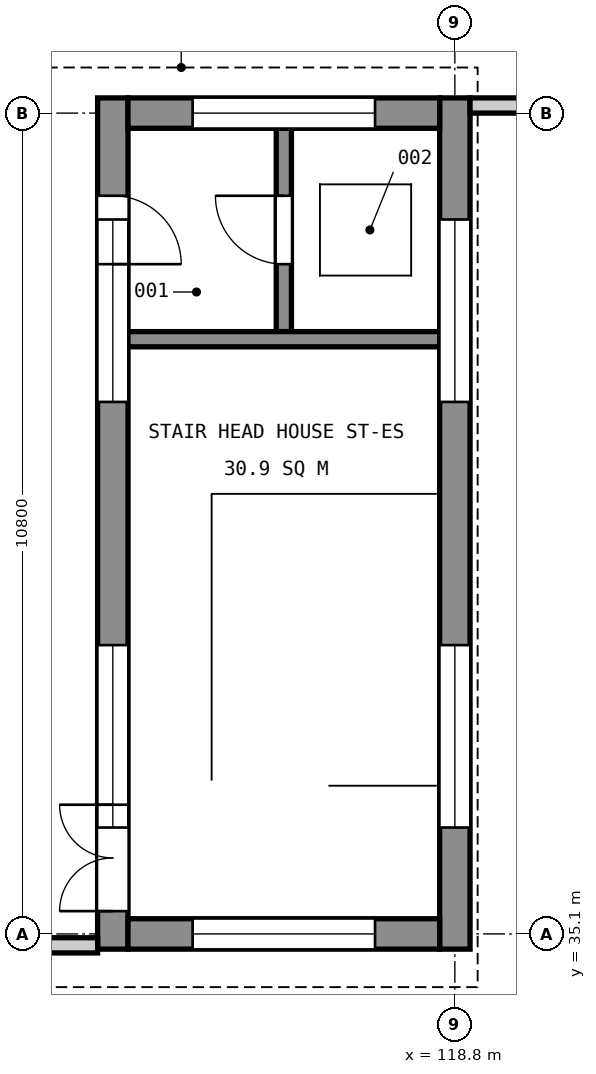
"""IFC4 building model, lengths in metres.
Left out: names, types, materials, properties, quantities, classifications, styles, units other than length and angle.
Written with IfcOpenShell. Run it as: python <this file> out.ifc"""

import sys

from ifc_helpers import new_model, si_unit, direction, frame, frame_2d, origin, place, context, subcontext, project, spatial, rectangle, extrude, element, fill, save


model = new_model("IFC4")
c1 = context("Model", 3, precision=1e-05, world=origin(), true_north=direction((0.0, 1.0)))
c2 = subcontext(c1, "Body", "Model", "MODEL_VIEW")
j1 = project(units=[si_unit("LENGTHUNIT", "METRE"), si_unit("PLANEANGLEUNIT", "RADIAN")], contexts=[c1])
p1 = place(None, origin())
s1 = spatial("IfcSite", under=j1, at=p1, CompositionType="ELEMENT")
p2 = place(p1, origin())
s2 = spatial("IfcBuilding", under=s1, at=p2, CompositionType="ELEMENT")
p3 = place(p2, frame((0.0, 0.0, 46.2)))
s3 = spatial("IfcBuildingStorey", under=s2, at=p3, CompositionType="ELEMENT", Elevation=46.2)
p4 = place(p3, frame((118.8, 34.9, 0.0), z_axis=(0.0, 0.0, 1.0), x_axis=(0.0, 1.0, 0.0)))
e1 = element("IfcWall", 1, at=p4, inside=s3, PredefinedType="SHEAR", context=c2, shape_type="SweptSolid", body=[
    extrude(rectangle(XDim=11.2, YDim=0.4, at=frame_2d((5.6, 0.0))), origin(), (0.0, 0.0, 1.0), 4.8),
])
p5 = place(p4, frame((1.6, 0.0, 3.4)))
e2 = element("IfcOpeningElement", 2, at=p5, cuts=e1, PredefinedType="OPENING", context=c2, shape_type="SweptSolid", body=[
    extrude(rectangle(XDim=2.4, YDim=1.2, at=frame_2d((1.2, 0.6))), frame((0.0, 0.21, 0.0), z_axis=(0.0, -1.0, 0.0), x_axis=(1.0, 0.0, 0.0)), (0.0, 0.0, 1.0), 0.42),
])
p6 = place(p4, frame((7.2, 0.0, 3.4)))
e3 = element("IfcOpeningElement", 3, at=p6, cuts=e1, PredefinedType="OPENING", context=c2, shape_type="SweptSolid", body=[
    extrude(rectangle(XDim=2.4, YDim=1.2, at=frame_2d((1.2, 0.6))), frame((0.0, 0.21, 0.0), z_axis=(0.0, -1.0, 0.0), x_axis=(1.0, 0.0, 0.0)), (0.0, 0.0, 1.0), 0.42),
])
p7 = place(p3, frame((114.3, 34.9, 0.0), z_axis=(0.0, 0.0, 1.0), x_axis=(0.0, 1.0, 0.0)))
e4 = element("IfcWall", 4, at=p7, inside=s3, PredefinedType="SHEAR", context=c2, shape_type="SweptSolid", body=[
    extrude(rectangle(XDim=11.2, YDim=0.4, at=frame_2d((5.6, 0.0))), origin(), (0.0, 0.0, 1.0), 4.8),
])
p8 = place(p7, frame((0.5, 0.0, 0.0)))
e5 = element("IfcOpeningElement", 5, at=p8, cuts=e4, PredefinedType="OPENING", context=c2, shape_type="SweptSolid", body=[
    extrude(rectangle(XDim=1.4, YDim=2.1, at=frame_2d((0.7, 1.05))), frame((0.0, 0.21, 0.0), z_axis=(0.0, -1.0, 0.0), x_axis=(1.0, 0.0, 0.0)), (0.0, 0.0, 1.0), 0.42),
])
p9 = place(p7, frame((1.6, 0.0, 3.4)))
e6 = element("IfcOpeningElement", 6, at=p9, cuts=e4, PredefinedType="OPENING", context=c2, shape_type="SweptSolid", body=[
    extrude(rectangle(XDim=2.4, YDim=1.2, at=frame_2d((1.2, 0.6))), frame((0.0, 0.21, 0.0), z_axis=(0.0, -1.0, 0.0), x_axis=(1.0, 0.0, 0.0)), (0.0, 0.0, 1.0), 0.42),
])
p10 = place(p7, frame((7.2, 0.0, 3.4)))
e7 = element("IfcOpeningElement", 7, at=p10, cuts=e4, PredefinedType="OPENING", context=c2, shape_type="SweptSolid", body=[
    extrude(rectangle(XDim=2.4, YDim=1.2, at=frame_2d((1.2, 0.6))), frame((0.0, 0.21, 0.0), z_axis=(0.0, -1.0, 0.0), x_axis=(1.0, 0.0, 0.0)), (0.0, 0.0, 1.0), 0.42),
])
p11 = place(p7, frame((9.012, 0.0, 0.0)))
e8 = element("IfcOpeningElement", 8, at=p11, cuts=e4, PredefinedType="OPENING", context=c2, shape_type="SweptSolid", body=[
    extrude(rectangle(XDim=0.9, YDim=2.1, at=frame_2d((0.45, 1.05))), frame((0.0, 0.21, 0.0), z_axis=(0.0, -1.0, 0.0), x_axis=(1.0, 0.0, 0.0)), (0.0, 0.0, 1.0), 0.42),
])
p12 = place(p3, frame((118.6, 35.1, 0.0), z_axis=(0.0, 0.0, 1.0), x_axis=(-1.0, 0.0, 0.0)))
e9 = element("IfcWall", 9, at=p12, inside=s3, PredefinedType="SHEAR", context=c2, shape_type="SweptSolid", body=[
    extrude(rectangle(XDim=4.1, YDim=0.4, at=frame_2d((2.05, 0.0))), origin(), (0.0, 0.0, 1.0), 4.8),
])
p13 = place(p12, frame((0.85, 0.0, 3.4)))
e10 = element("IfcOpeningElement", 10, at=p13, cuts=e9, PredefinedType="OPENING", context=c2, shape_type="SweptSolid", body=[
    extrude(rectangle(XDim=2.4, YDim=1.2, at=frame_2d((1.2, 0.6))), frame((0.0, 0.21, 0.0), z_axis=(0.0, -1.0, 0.0), x_axis=(1.0, 0.0, 0.0)), (0.0, 0.0, 1.0), 0.42),
])
p14 = place(p3, frame((118.6, 45.9, 0.0), z_axis=(0.0, 0.0, 1.0), x_axis=(-1.0, 0.0, 0.0)))
e11 = element("IfcWall", 11, at=p14, inside=s3, PredefinedType="SHEAR", context=c2, shape_type="SweptSolid", body=[
    extrude(rectangle(XDim=4.1, YDim=0.4, at=frame_2d((2.05, 0.0))), origin(), (0.0, 0.0, 1.0), 4.8),
])
p15 = place(p14, frame((0.85, 0.0, 3.4)))
e12 = element("IfcOpeningElement", 12, at=p15, cuts=e11, PredefinedType="OPENING", context=c2, shape_type="SweptSolid", body=[
    extrude(rectangle(XDim=2.4, YDim=1.2, at=frame_2d((1.2, 0.6))), frame((0.0, 0.21, 0.0), z_axis=(0.0, -1.0, 0.0), x_axis=(1.0, 0.0, 0.0)), (0.0, 0.0, 1.0), 0.42),
])
p16 = place(p3, frame((114.1, 34.95, 0.0), z_axis=(0.0, 0.0, 1.0), x_axis=(-1.0, 0.0, 0.0)))
e13 = element("IfcWall", 13, at=p16, inside=s3, PredefinedType="PARAPET", context=c2, shape_type="SweptSolid", body=[
    extrude(rectangle(XDim=2.5, YDim=0.2, at=frame_2d((1.25, 0.0))), origin(), (0.0, 0.0, 1.0), 1.2),
])
p17 = place(p3, frame((122.4, 46.0, 0.0), z_axis=(0.0, 0.0, 1.0), x_axis=(-1.0, 0.0, 0.0)))
e14 = element("IfcWall", 14, at=p17, inside=s3, PredefinedType="PARAPET", context=c2, shape_type="SweptSolid", body=[
    extrude(rectangle(XDim=3.4, YDim=0.2, at=frame_2d((1.7, 0.0))), origin(), (0.0, 0.0, 1.0), 1.2),
])
p18 = place(p3, frame((116.55, 43.025, 0.0), z_axis=(0.0, 0.0, 1.0), x_axis=(0.0, 1.0, 0.0)))
e15 = element("IfcWall", 15, at=p18, inside=s3, PredefinedType="SOLIDWALL", context=c2, shape_type="SweptSolid", body=[
    extrude(rectangle(XDim=2.675, YDim=0.2, at=frame_2d((1.337, 0.0))), origin(), (0.0, 0.0, 1.0), 4.8),
])
p19 = place(p18, frame((0.887, 0.0, 0.0)))
e16 = element("IfcOpeningElement", 16, at=p19, cuts=e15, PredefinedType="OPENING", context=c2, shape_type="SweptSolid", body=[
    extrude(rectangle(XDim=0.9, YDim=2.1, at=frame_2d((0.45, 1.05))), frame((0.0, 0.11, 0.0), z_axis=(0.0, -1.0, 0.0), x_axis=(1.0, 0.0, 0.0)), (0.0, 0.0, 1.0), 0.22),
])
p20 = place(p3, frame((114.5, 42.925, 0.0), z_axis=(0.0, 0.0, 1.0), x_axis=(1.0, 0.0, 0.0)))
e17 = element("IfcWall", 17, at=p20, inside=s3, PredefinedType="SOLIDWALL", context=c2, shape_type="SweptSolid", body=[
    extrude(rectangle(XDim=4.1, YDim=0.2, at=frame_2d((2.05, 0.0))), origin(), (0.0, 0.0, 1.0), 4.8),
])
p21 = place(p8, origin())
e18 = element("IfcDoor", 18, at=p21, inside=s3, OperationType="DOUBLE_DOOR_SINGLE_SWING", PredefinedType="DOOR", context=c2, shape_type="SweptSolid", body=[
    extrude(rectangle(XDim=1.4, YDim=2.1, at=frame_2d((0.7, 1.05))), frame((0.0, 0.025, 0.0), z_axis=(0.0, -1.0, 0.0), x_axis=(1.0, 0.0, 0.0)), (0.0, 0.0, 1.0), 0.05),
])
fill(e5, e18)
p22 = place(p5, origin())
e19 = element("IfcWindow", 19, at=p22, inside=s3, PartitioningType="SINGLE_PANEL", PredefinedType="USERDEFINED", context=c2, shape_type="SweptSolid", body=[
    extrude(rectangle(XDim=2.4, YDim=1.2, at=frame_2d((1.2, 0.6))), frame((0.0, 0.03, 0.0), z_axis=(0.0, -1.0, 0.0), x_axis=(1.0, 0.0, 0.0)), (0.0, 0.0, 1.0), 0.06),
])
fill(e2, e19)
p23 = place(p6, origin())
e20 = element("IfcWindow", 20, at=p23, inside=s3, PartitioningType="SINGLE_PANEL", PredefinedType="USERDEFINED", context=c2, shape_type="SweptSolid", body=[
    extrude(rectangle(XDim=2.4, YDim=1.2, at=frame_2d((1.2, 0.6))), frame((0.0, 0.03, 0.0), z_axis=(0.0, -1.0, 0.0), x_axis=(1.0, 0.0, 0.0)), (0.0, 0.0, 1.0), 0.06),
])
fill(e3, e20)
p24 = place(p9, origin())
e21 = element("IfcWindow", 21, at=p24, inside=s3, PartitioningType="SINGLE_PANEL", PredefinedType="USERDEFINED", context=c2, shape_type="SweptSolid", body=[
    extrude(rectangle(XDim=2.4, YDim=1.2, at=frame_2d((1.2, 0.6))), frame((0.0, 0.03, 0.0), z_axis=(0.0, -1.0, 0.0), x_axis=(1.0, 0.0, 0.0)), (0.0, 0.0, 1.0), 0.06),
])
fill(e6, e21)
p25 = place(p10, origin())
e22 = element("IfcWindow", 22, at=p25, inside=s3, PartitioningType="SINGLE_PANEL", PredefinedType="USERDEFINED", context=c2, shape_type="SweptSolid", body=[
    extrude(rectangle(XDim=2.4, YDim=1.2, at=frame_2d((1.2, 0.6))), frame((0.0, 0.03, 0.0), z_axis=(0.0, -1.0, 0.0), x_axis=(1.0, 0.0, 0.0)), (0.0, 0.0, 1.0), 0.06),
])
fill(e7, e22)
p26 = place(p13, origin())
e23 = element("IfcWindow", 23, at=p26, inside=s3, PartitioningType="SINGLE_PANEL", PredefinedType="USERDEFINED", context=c2, shape_type="SweptSolid", body=[
    extrude(rectangle(XDim=2.4, YDim=1.2, at=frame_2d((1.2, 0.6))), frame((0.0, 0.03, 0.0), z_axis=(0.0, -1.0, 0.0), x_axis=(1.0, 0.0, 0.0)), (0.0, 0.0, 1.0), 0.06),
])
fill(e10, e23)
p27 = place(p15, origin())
e24 = element("IfcWindow", 24, at=p27, inside=s3, PartitioningType="SINGLE_PANEL", PredefinedType="USERDEFINED", context=c2, shape_type="SweptSolid", body=[
    extrude(rectangle(XDim=2.4, YDim=1.2, at=frame_2d((1.2, 0.6))), frame((0.0, 0.03, 0.0), z_axis=(0.0, -1.0, 0.0), x_axis=(1.0, 0.0, 0.0)), (0.0, 0.0, 1.0), 0.06),
])
fill(e12, e24)
p28 = place(p11, frame((0.9, 0.0, 0.0), z_axis=(0.0, 0.0, 1.0), x_axis=(-1.0, 0.0, 0.0)))
e25 = element("IfcDoor", 25, at=p28, inside=s3, OperationType="SINGLE_SWING_RIGHT", PredefinedType="DOOR", context=c2, shape_type="SweptSolid", body=[
    extrude(rectangle(XDim=0.9, YDim=2.1, at=frame_2d((0.45, 1.05))), frame((0.0, 0.025, 0.0), z_axis=(0.0, -1.0, 0.0), x_axis=(1.0, 0.0, 0.0)), (0.0, 0.0, 1.0), 0.05),
])
fill(e8, e25)
p29 = place(p19, origin())
e26 = element("IfcDoor", 26, at=p29, inside=s3, OperationType="SINGLE_SWING_RIGHT", PredefinedType="DOOR", context=c2, shape_type="SweptSolid", body=[
    extrude(rectangle(XDim=0.9, YDim=2.1, at=frame_2d((0.45, 1.05))), frame((0.0, 0.025, 0.0), z_axis=(0.0, -1.0, 0.0), x_axis=(1.0, 0.0, 0.0)), (0.0, 0.0, 1.0), 0.05),
])
fill(e16, e26)
save(model, sys.argv[1])
